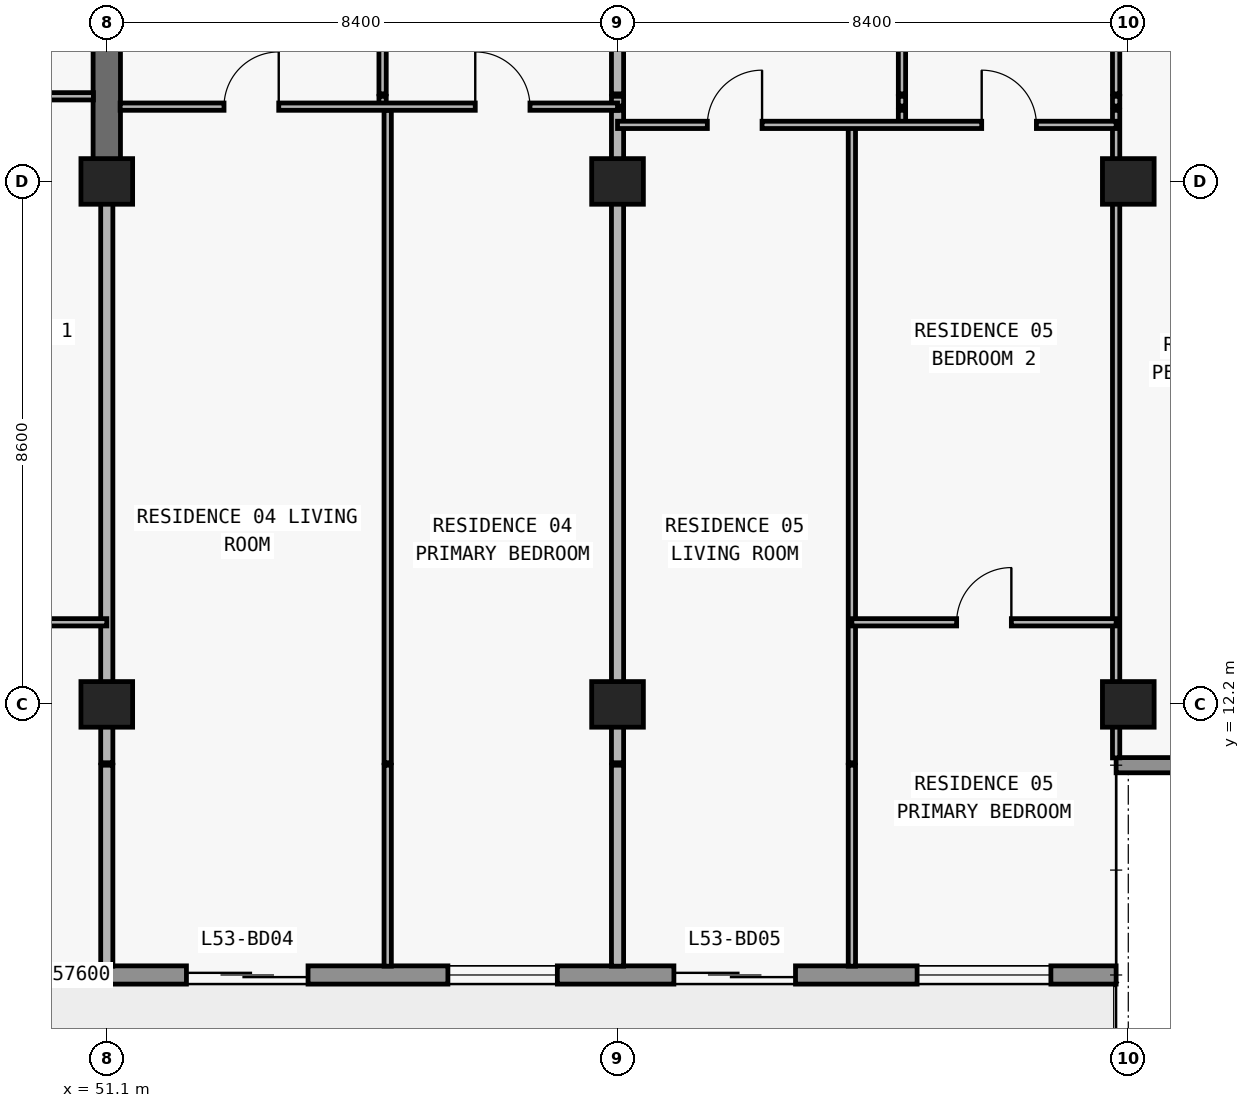
"""IFC4 building model, lengths in metres.
Left out: names, types, materials, properties, quantities, classifications, styles, units other than length and angle.
Written with IfcOpenShell. Run it as: python <this file> out.ifc"""

import sys

from ifc_helpers import new_model, si_unit, direction, frame, frame_2d, origin, origin_2d, place, context, subcontext, project, spatial, rectangle, extrude, element, fill, save


model = new_model("IFC4")
c1 = context("Model", 3, precision=1e-05, world=origin(), true_north=direction((0.0, 1.0)))
c2 = subcontext(c1, "Body", "Model", "MODEL_VIEW")
j1 = project(units=[si_unit("LENGTHUNIT", "METRE"), si_unit("PLANEANGLEUNIT", "RADIAN")], contexts=[c1])
p1 = place(None, origin())
s1 = spatial("IfcSite", under=j1, at=p1, CompositionType="ELEMENT")
p2 = place(p1, origin())
s2 = spatial("IfcBuilding", under=s1, at=p2, CompositionType="ELEMENT")
p3 = place(p2, frame((0.0, 0.0, 191.7)))
s3 = spatial("IfcBuildingStorey", under=s2, at=p3, CompositionType="ELEMENT", Elevation=191.7)
for number, where, z_axis, x_axis in (
    (1, (51.1, 12.2, 0.0), (0.0, 0.0, 1.0), (1.0, 0.0, 0.0)),
    (2, (59.5, 12.2, 0.0), (0.0, 0.0, 1.0), (1.0, 0.0, 0.0)),
    (3, (67.9, 12.2, 0.0), (0.0, 0.0, 1.0), (1.0, 0.0, 0.0)),
    (4, (51.1, 20.8, 0.0), (0.0, 0.0, 1.0), (1.0, 0.0, 0.0)),
    (5, (59.5, 20.8, 0.0), (0.0, 0.0, 1.0), (1.0, 0.0, 0.0)),
    (6, (67.9, 20.8, 0.0), (0.0, 0.0, 1.0), (1.0, 0.0, 0.0)),
):
    element("IfcColumn", number, at=place(p3, frame(where, z_axis=z_axis, x_axis=x_axis)), inside=s3, PredefinedType="COLUMN", context=c2, shape_type="SweptSolid", body=[
        extrude(rectangle(XDim=0.85, YDim=0.75, at=origin_2d()), origin(), (0.0, 0.0, 1.0), 3.05),
    ])
p4 = place(p3, frame((51.1, 20.8, 0.0), z_axis=(0.0, 0.0, 1.0), x_axis=(0.0, 1.0, 0.0)))
e7 = element("IfcWall", 7, at=p4, inside=s3, PredefinedType="SHEAR", context=c2, shape_type="SweptSolid", body=[
    extrude(rectangle(XDim=8.6, YDim=0.45, at=frame_2d((4.3, 0.0))), origin(), (0.0, 0.0, 1.0), 3.05),
])
p5 = place(p3, frame((67.7, 7.75, 0.0), z_axis=(0.0, 0.0, 1.0), x_axis=(-1.0, 0.0, 0.0)))
e8 = element("IfcWall", 8, at=p5, inside=s3, PredefinedType="STANDARD", context=c2, shape_type="SweptSolid", body=[
    extrude(rectangle(XDim=57.6, YDim=0.3, at=frame_2d((28.8, 0.0))), origin(), (0.0, 0.0, 1.0), 3.05),
])
p6 = place(p5, frame((54.69, 0.0, 0.0)))
e9 = element("IfcOpeningElement", 9, at=p6, cuts=e8, PredefinedType="OPENING", context=c2, shape_type="SweptSolid", body=[
    extrude(rectangle(XDim=2.0, YDim=2.3, at=frame_2d((1.0, 1.15))), frame((0.0, 0.16, 0.0), z_axis=(0.0, -1.0, 0.0), x_axis=(1.0, 0.0, 0.0)), (0.0, 0.0, 1.0), 0.32),
])
p7 = place(p5, frame((50.21, 0.0, 0.65)))
e10 = element("IfcOpeningElement", 10, at=p7, cuts=e8, PredefinedType="OPENING", context=c2, shape_type="SweptSolid", body=[
    extrude(rectangle(XDim=2.6, YDim=1.85, at=frame_2d((1.3, 0.925))), frame((0.0, 0.16, 0.0), z_axis=(0.0, -1.0, 0.0), x_axis=(1.0, 0.0, 0.0)), (0.0, 0.0, 1.0), 0.32),
])
p8 = place(p5, frame((44.1, 0.0, 0.85)))
e11 = element("IfcOpeningElement", 11, at=p8, cuts=e8, PredefinedType="OPENING", context=c2, shape_type="SweptSolid", body=[
    extrude(rectangle(XDim=2.2, YDim=1.55, at=frame_2d((1.1, 0.775))), frame((0.0, 0.16, 0.0), z_axis=(0.0, -1.0, 0.0), x_axis=(1.0, 0.0, 0.0)), (0.0, 0.0, 1.0), 0.32),
])
p9 = place(p5, frame((37.69, 0.0, 0.0)))
e12 = element("IfcOpeningElement", 12, at=p9, cuts=e8, PredefinedType="OPENING", context=c2, shape_type="SweptSolid", body=[
    extrude(rectangle(XDim=2.0, YDim=2.3, at=frame_2d((1.0, 1.15))), frame((0.0, 0.16, 0.0), z_axis=(0.0, -1.0, 0.0), x_axis=(1.0, 0.0, 0.0)), (0.0, 0.0, 1.0), 0.32),
])
p10 = place(p5, frame((33.59, 0.0, 0.85)))
e13 = element("IfcOpeningElement", 13, at=p10, cuts=e8, PredefinedType="OPENING", context=c2, shape_type="SweptSolid", body=[
    extrude(rectangle(XDim=1.8, YDim=1.55, at=frame_2d((0.9, 0.775))), frame((0.0, 0.16, 0.0), z_axis=(0.0, -1.0, 0.0), x_axis=(1.0, 0.0, 0.0)), (0.0, 0.0, 1.0), 0.32),
])
p11 = place(p5, frame((29.69, 0.0, 0.0)))
e14 = element("IfcOpeningElement", 14, at=p11, cuts=e8, PredefinedType="OPENING", context=c2, shape_type="SweptSolid", body=[
    extrude(rectangle(XDim=2.0, YDim=2.3, at=frame_2d((1.0, 1.15))), frame((0.0, 0.16, 0.0), z_axis=(0.0, -1.0, 0.0), x_axis=(1.0, 0.0, 0.0)), (0.0, 0.0, 1.0), 0.32),
])
p12 = place(p5, frame((25.81, 0.0, 0.65)))
e15 = element("IfcOpeningElement", 15, at=p12, cuts=e8, PredefinedType="OPENING", context=c2, shape_type="SweptSolid", body=[
    extrude(rectangle(XDim=2.6, YDim=1.85, at=frame_2d((1.3, 0.925))), frame((0.0, 0.16, 0.0), z_axis=(0.0, -1.0, 0.0), x_axis=(1.0, 0.0, 0.0)), (0.0, 0.0, 1.0), 0.32),
])
p13 = place(p5, frame((19.7, 0.0, 0.85)))
e16 = element("IfcOpeningElement", 16, at=p13, cuts=e8, PredefinedType="OPENING", context=c2, shape_type="SweptSolid", body=[
    extrude(rectangle(XDim=2.2, YDim=1.55, at=frame_2d((1.1, 0.775))), frame((0.0, 0.16, 0.0), z_axis=(0.0, -1.0, 0.0), x_axis=(1.0, 0.0, 0.0)), (0.0, 0.0, 1.0), 0.32),
])
p14 = place(p5, frame((13.29, 0.0, 0.0)))
e17 = element("IfcOpeningElement", 17, at=p14, cuts=e8, PredefinedType="OPENING", context=c2, shape_type="SweptSolid", body=[
    extrude(rectangle(XDim=2.0, YDim=2.3, at=frame_2d((1.0, 1.15))), frame((0.0, 0.16, 0.0), z_axis=(0.0, -1.0, 0.0), x_axis=(1.0, 0.0, 0.0)), (0.0, 0.0, 1.0), 0.32),
])
p15 = place(p5, frame((9.19, 0.0, 0.85)))
e18 = element("IfcOpeningElement", 18, at=p15, cuts=e8, PredefinedType="OPENING", context=c2, shape_type="SweptSolid", body=[
    extrude(rectangle(XDim=1.8, YDim=1.55, at=frame_2d((0.9, 0.775))), frame((0.0, 0.16, 0.0), z_axis=(0.0, -1.0, 0.0), x_axis=(1.0, 0.0, 0.0)), (0.0, 0.0, 1.0), 0.32),
])
p16 = place(p5, frame((5.273, 0.0, 0.0)))
e19 = element("IfcOpeningElement", 19, at=p16, cuts=e8, PredefinedType="OPENING", context=c2, shape_type="SweptSolid", body=[
    extrude(rectangle(XDim=2.0, YDim=2.3, at=frame_2d((1.0, 1.15))), frame((0.0, 0.16, 0.0), z_axis=(0.0, -1.0, 0.0), x_axis=(1.0, 0.0, 0.0)), (0.0, 0.0, 1.0), 0.32),
])
p17 = place(p5, frame((1.073, 0.0, 0.85)))
e20 = element("IfcOpeningElement", 20, at=p17, cuts=e8, PredefinedType="OPENING", context=c2, shape_type="SweptSolid", body=[
    extrude(rectangle(XDim=2.2, YDim=1.55, at=frame_2d((1.1, 0.775))), frame((0.0, 0.16, 0.0), z_axis=(0.0, -1.0, 0.0), x_axis=(1.0, 0.0, 0.0)), (0.0, 0.0, 1.0), 0.32),
])
p18 = place(p3, frame((67.7, 11.2, 0.0), z_axis=(0.0, 0.0, 1.0), x_axis=(1.0, 0.0, 0.0)))
e21 = element("IfcWall", 21, at=p18, inside=s3, PredefinedType="ELEMENTEDWALL", context=c2, shape_type="SweptSolid", body=[
    extrude(rectangle(XDim=3.85, YDim=0.25, at=frame_2d((1.925, 0.0))), origin(), (0.0, 0.0, 1.0), 3.05),
])
p19 = place(p3, frame((51.1, 7.895, 0.0), z_axis=(0.0, 0.0, 1.0), x_axis=(0.0, 1.0, 0.0)))
e22 = element("IfcWall", 22, at=p19, inside=s3, PredefinedType="PARTITIONING", context=c2, shape_type="SweptSolid", body=[
    extrude(rectangle(XDim=3.305, YDim=0.2, at=frame_2d((1.652, 0.0))), origin(), (0.0, 0.0, 1.0), 3.05),
])
p20 = place(p3, frame((51.1, 11.24, 0.0), z_axis=(0.0, 0.0, 1.0), x_axis=(0.0, 1.0, 0.0)))
e23 = element("IfcWall", 23, at=p20, inside=s3, PredefinedType="PARTITIONING", context=c2, shape_type="SweptSolid", body=[
    extrude(rectangle(XDim=9.555, YDim=0.2, at=frame_2d((4.777, 0.0))), origin(), (0.0, 0.0, 1.0), 2.263),
])
p21 = place(p3, frame((55.636, 22.04, 0.0), z_axis=(0.0, 0.0, 1.0), x_axis=(0.0, 1.0, 0.0)))
e24 = element("IfcWall", 24, at=p21, inside=s3, PredefinedType="PARTITIONING", context=c2, shape_type="SweptSolid", body=[
    extrude(rectangle(XDim=0.16, YDim=0.12, at=frame_2d((0.08, 0.0))), origin(), (0.0, 0.0, 1.0), 3.05),
])
p22 = place(p3, frame((55.636, 22.24, 0.0), z_axis=(0.0, 0.0, 1.0), x_axis=(0.0, 1.0, 0.0)))
e25 = element("IfcWall", 25, at=p22, inside=s3, PredefinedType="PARTITIONING", context=c2, shape_type="SweptSolid", body=[
    extrude(rectangle(XDim=4.36, YDim=0.12, at=frame_2d((2.18, 0.0))), origin(), (0.0, 0.0, 1.0), 3.05),
])
p23 = place(p22, frame((1.73, 0.0, 0.0)))
e26 = element("IfcOpeningElement", 26, at=p23, cuts=e25, PredefinedType="OPENING", context=c2, shape_type="SweptSolid", body=[
    extrude(rectangle(XDim=0.9, YDim=2.15, at=frame_2d((0.45, 1.075))), frame((0.0, 0.07, 0.0), z_axis=(0.0, -1.0, 0.0), x_axis=(1.0, 0.0, 0.0)), (0.0, 0.0, 1.0), 0.14),
])
p24 = place(p3, frame((55.72, 7.895, 0.0), z_axis=(0.0, 0.0, 1.0), x_axis=(0.0, 1.0, 0.0)))
e27 = element("IfcWall", 27, at=p24, inside=s3, PredefinedType="PARTITIONING", context=c2, shape_type="SweptSolid", body=[
    extrude(rectangle(XDim=3.305, YDim=0.12, at=frame_2d((1.652, 0.0))), origin(), (0.0, 0.0, 1.0), 3.05),
])
p25 = place(p3, frame((55.72, 11.24, 0.0), z_axis=(0.0, 0.0, 1.0), x_axis=(0.0, 1.0, 0.0)))
e28 = element("IfcWall", 28, at=p25, inside=s3, PredefinedType="PARTITIONING", context=c2, shape_type="SweptSolid", body=[
    extrude(rectangle(XDim=10.73, YDim=0.12, at=frame_2d((5.365, 0.0))), origin(), (0.0, 0.0, 1.0), 3.05),
])
p26 = place(p3, frame((59.5, 7.895, 0.0), z_axis=(0.0, 0.0, 1.0), x_axis=(0.0, 1.0, 0.0)))
e29 = element("IfcWall", 29, at=p26, inside=s3, PredefinedType="PARTITIONING", context=c2, shape_type="SweptSolid", body=[
    extrude(rectangle(XDim=3.305, YDim=0.2, at=frame_2d((1.652, 0.0))), origin(), (0.0, 0.0, 1.0), 3.05),
])
p27 = place(p3, frame((59.5, 11.24, 0.0), z_axis=(0.0, 0.0, 1.0), x_axis=(0.0, 1.0, 0.0)))
e30 = element("IfcWall", 30, at=p27, inside=s3, PredefinedType="PARTITIONING", context=c2, shape_type="SweptSolid", body=[
    extrude(rectangle(XDim=10.73, YDim=0.2, at=frame_2d((5.365, 0.0))), origin(), (0.0, 0.0, 1.0), 2.263),
])
p28 = place(p3, frame((59.5, 22.04, 0.0), z_axis=(0.0, 0.0, 1.0), x_axis=(0.0, 1.0, 0.0)))
e31 = element("IfcWall", 31, at=p28, inside=s3, PredefinedType="PARTITIONING", context=c2, shape_type="SweptSolid", body=[
    extrude(rectangle(XDim=0.16, YDim=0.2, at=frame_2d((0.08, 0.0))), origin(), (0.0, 0.0, 1.0), 2.263),
])
p29 = place(p3, frame((59.5, 22.24, 0.0), z_axis=(0.0, 0.0, 1.0), x_axis=(0.0, 1.0, 0.0)))
e32 = element("IfcWall", 32, at=p29, inside=s3, PredefinedType="PARTITIONING", context=c2, shape_type="SweptSolid", body=[
    extrude(rectangle(XDim=4.36, YDim=0.2, at=frame_2d((2.18, 0.0))), origin(), (0.0, 0.0, 1.0), 2.263),
])
p30 = place(p3, frame((63.354, 7.895, 0.0), z_axis=(0.0, 0.0, 1.0), x_axis=(0.0, 1.0, 0.0)))
e33 = element("IfcWall", 33, at=p30, inside=s3, PredefinedType="PARTITIONING", context=c2, shape_type="SweptSolid", body=[
    extrude(rectangle(XDim=3.305, YDim=0.12, at=frame_2d((1.652, 0.0))), origin(), (0.0, 0.0, 1.0), 3.05),
])
p31 = place(p3, frame((63.354, 11.24, 0.0), z_axis=(0.0, 0.0, 1.0), x_axis=(0.0, 1.0, 0.0)))
e34 = element("IfcWall", 34, at=p31, inside=s3, PredefinedType="PARTITIONING", context=c2, shape_type="SweptSolid", body=[
    extrude(rectangle(XDim=10.49, YDim=0.12, at=frame_2d((5.245, 0.0))), origin(), (0.0, 0.0, 1.0), 3.05),
])
p32 = place(p3, frame((64.178, 21.73, 0.0), z_axis=(0.0, 0.0, 1.0), x_axis=(0.0, 1.0, 0.0)))
e35 = element("IfcWall", 35, at=p32, inside=s3, PredefinedType="PARTITIONING", context=c2, shape_type="SweptSolid", body=[
    extrude(rectangle(XDim=0.24, YDim=0.12, at=frame_2d((0.12, 0.0))), origin(), (0.0, 0.0, 1.0), 3.05),
])
p33 = place(p3, frame((64.178, 22.04, 0.0), z_axis=(0.0, 0.0, 1.0), x_axis=(0.0, 1.0, 0.0)))
e36 = element("IfcWall", 36, at=p33, inside=s3, PredefinedType="PARTITIONING", context=c2, shape_type="SweptSolid", body=[
    extrude(rectangle(XDim=0.16, YDim=0.12, at=frame_2d((0.08, 0.0))), origin(), (0.0, 0.0, 1.0), 3.05),
])
p34 = place(p3, frame((64.178, 22.24, 0.0), z_axis=(0.0, 0.0, 1.0), x_axis=(0.0, 1.0, 0.0)))
e37 = element("IfcWall", 37, at=p34, inside=s3, PredefinedType="PARTITIONING", context=c2, shape_type="SweptSolid", body=[
    extrude(rectangle(XDim=4.36, YDim=0.12, at=frame_2d((2.18, 0.0))), origin(), (0.0, 0.0, 1.0), 3.05),
])
p35 = place(p34, frame((1.73, 0.0, 0.0)))
e38 = element("IfcOpeningElement", 38, at=p35, cuts=e37, PredefinedType="OPENING", context=c2, shape_type="SweptSolid", body=[
    extrude(rectangle(XDim=0.9, YDim=2.15, at=frame_2d((0.45, 1.075))), frame((0.0, 0.07, 0.0), z_axis=(0.0, -1.0, 0.0), x_axis=(1.0, 0.0, 0.0)), (0.0, 0.0, 1.0), 0.14),
])
p36 = place(p3, frame((67.7, 11.32, 0.0), z_axis=(0.0, 0.0, 1.0), x_axis=(0.0, 1.0, 0.0)))
e39 = element("IfcWall", 39, at=p36, inside=s3, PredefinedType="PARTITIONING", context=c2, shape_type="SweptSolid", body=[
    extrude(rectangle(XDim=10.65, YDim=0.12, at=frame_2d((5.325, 0.0))), origin(), (0.0, 0.0, 1.0), 2.263),
])
p37 = place(p3, frame((67.7, 22.04, 0.0), z_axis=(0.0, 0.0, 1.0), x_axis=(0.0, 1.0, 0.0)))
e40 = element("IfcWall", 40, at=p37, inside=s3, PredefinedType="PARTITIONING", context=c2, shape_type="SweptSolid", body=[
    extrude(rectangle(XDim=0.16, YDim=0.12, at=frame_2d((0.08, 0.0))), origin(), (0.0, 0.0, 1.0), 2.263),
])
p38 = place(p3, frame((67.7, 22.24, 0.0), z_axis=(0.0, 0.0, 1.0), x_axis=(0.0, 1.0, 0.0)))
e41 = element("IfcWall", 41, at=p38, inside=s3, PredefinedType="PARTITIONING", context=c2, shape_type="SweptSolid", body=[
    extrude(rectangle(XDim=4.36, YDim=0.12, at=frame_2d((2.18, 0.0))), origin(), (0.0, 0.0, 1.0), 2.263),
])
p39 = place(p38, frame((1.73, 0.0, 0.0)))
e42 = element("IfcOpeningElement", 42, at=p39, cuts=e41, PredefinedType="OPENING", context=c2, shape_type="SweptSolid", body=[
    extrude(rectangle(XDim=0.9, YDim=2.15, at=frame_2d((0.45, 1.075))), frame((0.0, 0.07, 0.0), z_axis=(0.0, -1.0, 0.0), x_axis=(1.0, 0.0, 0.0)), (0.0, 0.0, 1.0), 0.14),
])
p40 = place(p3, frame((42.7, 13.55, 0.0), z_axis=(0.0, 0.0, 1.0), x_axis=(1.0, 0.0, 0.0)))
e43 = element("IfcWall", 43, at=p40, inside=s3, PredefinedType="PARTITIONING", context=c2, shape_type="SweptSolid", body=[
    extrude(rectangle(XDim=8.4, YDim=0.12, at=frame_2d((4.2, 0.0))), origin(), (0.0, 0.0, 1.0), 3.05),
])
p41 = place(p40, frame((3.75, 0.0, 0.0)))
e44 = element("IfcOpeningElement", 44, at=p41, cuts=e43, PredefinedType="OPENING", context=c2, shape_type="SweptSolid", body=[
    extrude(rectangle(XDim=0.9, YDim=2.15, at=frame_2d((0.45, 1.075))), frame((0.0, 0.07, 0.0), z_axis=(0.0, -1.0, 0.0), x_axis=(1.0, 0.0, 0.0)), (0.0, 0.0, 1.0), 0.14),
])
p42 = place(p3, frame((63.354, 13.55, 0.0), z_axis=(0.0, 0.0, 1.0), x_axis=(1.0, 0.0, 0.0)))
e45 = element("IfcWall", 45, at=p42, inside=s3, PredefinedType="PARTITIONING", context=c2, shape_type="SweptSolid", body=[
    extrude(rectangle(XDim=4.346, YDim=0.12, at=frame_2d((2.173, 0.0))), origin(), (0.0, 0.0, 1.0), 3.05),
])
p43 = place(p42, frame((1.723, 0.0, 0.0)))
e46 = element("IfcOpeningElement", 46, at=p43, cuts=e45, PredefinedType="OPENING", context=c2, shape_type="SweptSolid", body=[
    extrude(rectangle(XDim=0.9, YDim=2.15, at=frame_2d((0.45, 1.075))), frame((0.0, 0.07, 0.0), z_axis=(0.0, -1.0, 0.0), x_axis=(1.0, 0.0, 0.0)), (0.0, 0.0, 1.0), 0.14),
])
p44 = place(p3, frame((59.5, 21.73, 0.0), z_axis=(0.0, 0.0, 1.0), x_axis=(1.0, 0.0, 0.0)))
e47 = element("IfcWall", 47, at=p44, inside=s3, PredefinedType="PARTITIONING", context=c2, shape_type="SweptSolid", body=[
    extrude(rectangle(XDim=8.2, YDim=0.12, at=frame_2d((4.1, 0.0))), origin(), (0.0, 0.0, 1.0), 3.05),
])
p45 = place(p44, frame((1.477, 0.0, 0.0)))
e48 = element("IfcOpeningElement", 48, at=p45, cuts=e47, PredefinedType="OPENING", context=c2, shape_type="SweptSolid", body=[
    extrude(rectangle(XDim=0.9, YDim=2.15, at=frame_2d((0.45, 1.075))), frame((0.0, 0.07, 0.0), z_axis=(0.0, -1.0, 0.0), x_axis=(1.0, 0.0, 0.0)), (0.0, 0.0, 1.0), 0.14),
])
p46 = place(p44, frame((5.989, 0.0, 0.0)))
e49 = element("IfcOpeningElement", 49, at=p46, cuts=e47, PredefinedType="OPENING", context=c2, shape_type="SweptSolid", body=[
    extrude(rectangle(XDim=0.9, YDim=2.15, at=frame_2d((0.45, 1.075))), frame((0.0, 0.07, 0.0), z_axis=(0.0, -1.0, 0.0), x_axis=(1.0, 0.0, 0.0)), (0.0, 0.0, 1.0), 0.14),
])
p47 = place(p3, frame((51.32, 22.03, 0.0), z_axis=(0.0, 0.0, 1.0), x_axis=(1.0, 0.0, 0.0)))
e50 = element("IfcWall", 50, at=p47, inside=s3, PredefinedType="PARTITIONING", context=c2, shape_type="SweptSolid", body=[
    extrude(rectangle(XDim=8.18, YDim=0.12, at=frame_2d((4.09, 0.0))), origin(), (0.0, 0.0, 1.0), 3.05),
])
p48 = place(p47, frame((1.708, 0.0, 0.0)))
e51 = element("IfcOpeningElement", 51, at=p48, cuts=e50, PredefinedType="OPENING", context=c2, shape_type="SweptSolid", body=[
    extrude(rectangle(XDim=0.9, YDim=2.15, at=frame_2d((0.45, 1.075))), frame((0.0, 0.07, 0.0), z_axis=(0.0, -1.0, 0.0), x_axis=(1.0, 0.0, 0.0)), (0.0, 0.0, 1.0), 0.14),
])
p49 = place(p47, frame((5.84, 0.0, 0.0)))
e52 = element("IfcOpeningElement", 52, at=p49, cuts=e50, PredefinedType="OPENING", context=c2, shape_type="SweptSolid", body=[
    extrude(rectangle(XDim=0.9, YDim=2.15, at=frame_2d((0.45, 1.075))), frame((0.0, 0.07, 0.0), z_axis=(0.0, -1.0, 0.0), x_axis=(1.0, 0.0, 0.0)), (0.0, 0.0, 1.0), 0.14),
])
p50 = place(p3, frame((42.705, 22.2, 0.0), z_axis=(0.0, 0.0, 1.0), x_axis=(1.0, 0.0, 0.0)))
e53 = element("IfcWall", 53, at=p50, inside=s3, PredefinedType="PARTITIONING", context=c2, shape_type="SweptSolid", body=[
    extrude(rectangle(XDim=8.175, YDim=0.12, at=frame_2d((4.087, 0.0))), origin(), (0.0, 0.0, 1.0), 3.05),
])
p51 = place(p50, frame((3.637, 0.0, 0.0)))
e54 = element("IfcOpeningElement", 54, at=p51, cuts=e53, PredefinedType="OPENING", context=c2, shape_type="SweptSolid", body=[
    extrude(rectangle(XDim=0.9, YDim=2.15, at=frame_2d((0.45, 1.075))), frame((0.0, 0.07, 0.0), z_axis=(0.0, -1.0, 0.0), x_axis=(1.0, 0.0, 0.0)), (0.0, 0.0, 1.0), 0.14),
])
p52 = place(p14, origin())
e55 = element("IfcDoor", 55, at=p52, inside=s3, OperationType="DOUBLE_DOOR_SLIDING", PredefinedType="DOOR", context=c2, shape_type="SweptSolid", body=[
    extrude(rectangle(XDim=2.0, YDim=2.3, at=frame_2d((1.0, 1.15))), frame((0.0, 0.025, 0.0), z_axis=(0.0, -1.0, 0.0), x_axis=(1.0, 0.0, 0.0)), (0.0, 0.0, 1.0), 0.05),
])
fill(e17, e55)
p53 = place(p15, origin())
e56 = element("IfcWindow", 56, at=p53, inside=s3, PartitioningType="SINGLE_PANEL", PredefinedType="WINDOW", context=c2, shape_type="SweptSolid", body=[
    extrude(rectangle(XDim=1.8, YDim=1.55, at=frame_2d((0.9, 0.775))), frame((0.0, 0.03, 0.0), z_axis=(0.0, -1.0, 0.0), x_axis=(1.0, 0.0, 0.0)), (0.0, 0.0, 1.0), 0.06),
])
fill(e18, e56)
p54 = place(p16, origin())
e57 = element("IfcDoor", 57, at=p54, inside=s3, OperationType="DOUBLE_DOOR_SLIDING", PredefinedType="DOOR", context=c2, shape_type="SweptSolid", body=[
    extrude(rectangle(XDim=2.0, YDim=2.3, at=frame_2d((1.0, 1.15))), frame((0.0, 0.025, 0.0), z_axis=(0.0, -1.0, 0.0), x_axis=(1.0, 0.0, 0.0)), (0.0, 0.0, 1.0), 0.05),
])
fill(e19, e57)
p55 = place(p17, origin())
e58 = element("IfcWindow", 58, at=p55, inside=s3, PartitioningType="SINGLE_PANEL", PredefinedType="WINDOW", context=c2, shape_type="SweptSolid", body=[
    extrude(rectangle(XDim=2.2, YDim=1.55, at=frame_2d((1.1, 0.775))), frame((0.0, 0.03, 0.0), z_axis=(0.0, -1.0, 0.0), x_axis=(1.0, 0.0, 0.0)), (0.0, 0.0, 1.0), 0.06),
])
fill(e20, e58)
p56 = place(p48, origin())
e59 = element("IfcDoor", 59, at=p56, inside=s3, OperationType="SINGLE_SWING_RIGHT", PredefinedType="DOOR", context=c2, shape_type="SweptSolid", body=[
    extrude(rectangle(XDim=0.9, YDim=2.15, at=frame_2d((0.45, 1.075))), frame((0.0, 0.025, 0.0), z_axis=(0.0, -1.0, 0.0), x_axis=(1.0, 0.0, 0.0)), (0.0, 0.0, 1.0), 0.05),
])
fill(e51, e59)
p57 = place(p49, origin())
e60 = element("IfcDoor", 60, at=p57, inside=s3, OperationType="SINGLE_SWING_LEFT", PredefinedType="DOOR", context=c2, shape_type="SweptSolid", body=[
    extrude(rectangle(XDim=0.9, YDim=2.15, at=frame_2d((0.45, 1.075))), frame((0.0, 0.025, 0.0), z_axis=(0.0, -1.0, 0.0), x_axis=(1.0, 0.0, 0.0)), (0.0, 0.0, 1.0), 0.05),
])
fill(e52, e60)
p58 = place(p45, origin())
e61 = element("IfcDoor", 61, at=p58, inside=s3, OperationType="SINGLE_SWING_RIGHT", PredefinedType="DOOR", context=c2, shape_type="SweptSolid", body=[
    extrude(rectangle(XDim=0.9, YDim=2.15, at=frame_2d((0.45, 1.075))), frame((0.0, 0.025, 0.0), z_axis=(0.0, -1.0, 0.0), x_axis=(1.0, 0.0, 0.0)), (0.0, 0.0, 1.0), 0.05),
])
fill(e48, e61)
p59 = place(p46, origin())
e62 = element("IfcDoor", 62, at=p59, inside=s3, OperationType="SINGLE_SWING_LEFT", PredefinedType="DOOR", context=c2, shape_type="SweptSolid", body=[
    extrude(rectangle(XDim=0.9, YDim=2.15, at=frame_2d((0.45, 1.075))), frame((0.0, 0.025, 0.0), z_axis=(0.0, -1.0, 0.0), x_axis=(1.0, 0.0, 0.0)), (0.0, 0.0, 1.0), 0.05),
])
fill(e49, e62)
p60 = place(p43, origin())
e63 = element("IfcDoor", 63, at=p60, inside=s3, OperationType="SINGLE_SWING_RIGHT", PredefinedType="DOOR", context=c2, shape_type="SweptSolid", body=[
    extrude(rectangle(XDim=0.9, YDim=2.15, at=frame_2d((0.45, 1.075))), frame((0.0, 0.025, 0.0), z_axis=(0.0, -1.0, 0.0), x_axis=(1.0, 0.0, 0.0)), (0.0, 0.0, 1.0), 0.05),
])
fill(e46, e63)
save(model, sys.argv[1])
